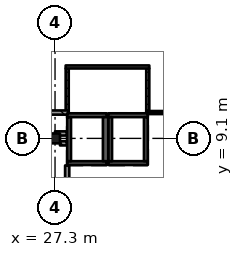
"""IFC4 building model, lengths in metres.
Left out: names, types, materials, properties, quantities, classifications, styles, units other than length and angle.
Written with IfcOpenShell. Run it as: python <this file> out.ifc"""

import sys

from ifc_helpers import new_model, si_unit, direction, frame, frame_2d, origin, origin_2d, place, context, subcontext, project, spatial, rectangle, extrude, element, fill, save


model = new_model("IFC4")
c1 = context("Model", 3, precision=1e-05, world=origin(), true_north=direction((0.0, 1.0)))
c2 = subcontext(c1, "Body", "Model", "MODEL_VIEW")
j1 = project(units=[si_unit("LENGTHUNIT", "METRE"), si_unit("PLANEANGLEUNIT", "RADIAN")], contexts=[c1])
p1 = place(None, origin())
s1 = spatial("IfcSite", under=j1, at=p1, CompositionType="ELEMENT")
p2 = place(p1, origin())
s2 = spatial("IfcBuilding", under=s1, at=p2, CompositionType="ELEMENT")
p3 = place(p2, frame((0.0, 0.0, 15.47)))
s3 = spatial("IfcBuildingStorey", under=s2, at=p3, CompositionType="ELEMENT", Elevation=15.47)
p4 = place(p3, frame((27.3, 9.1, 0.0), z_axis=(0.0, 0.0, 1.0), x_axis=(1.0, 0.0, 0.0)))
e1 = element("IfcColumn", 1, at=p4, inside=s3, PredefinedType="COLUMN", context=c2, shape_type="SweptSolid", body=[
    extrude(rectangle(XDim=0.65, YDim=0.65, at=origin_2d()), origin(), (0.0, 0.0, 1.0), 4.55),
])
p5 = place(p3, frame((30.7, 7.475, 0.0), z_axis=(0.0, 0.0, 1.0), x_axis=(-1.0, 0.0, 0.0)))
e2 = element("IfcWall", 2, at=p5, inside=s3, PredefinedType="SHEAR", context=c2, shape_type="SweptSolid", body=[
    extrude(rectangle(XDim=2.6, YDim=0.25, at=frame_2d((1.3, 0.0))), origin(), (0.0, 0.0, 1.0), 4.55),
])
p6 = place(p3, frame((30.7, 10.625, 0.0), z_axis=(0.0, 0.0, 1.0), x_axis=(-1.0, 0.0, 0.0)))
e3 = element("IfcWall", 3, at=p6, inside=s3, PredefinedType="SHEAR", context=c2, shape_type="SweptSolid", body=[
    extrude(rectangle(XDim=2.6, YDim=0.25, at=frame_2d((1.3, 0.0))), origin(), (0.0, 0.0, 1.0), 4.55),
])
p7 = place(p6, frame((0.8, 0.0, 0.0)))
e4 = element("IfcOpeningElement", 4, at=p7, cuts=e3, PredefinedType="OPENING", context=c2, shape_type="SweptSolid", body=[
    extrude(rectangle(XDim=1.0, YDim=2.1, at=frame_2d((0.5, 1.05))), frame((0.0, 0.135, 0.0), z_axis=(0.0, -1.0, 0.0), x_axis=(1.0, 0.0, 0.0)), (0.0, 0.0, 1.0), 0.27),
])
p8 = place(p3, frame((28.225, 10.5, 0.0), z_axis=(0.0, 0.0, 1.0), x_axis=(0.0, -1.0, 0.0)))
e5 = element("IfcWall", 5, at=p8, inside=s3, PredefinedType="SHEAR", context=c2, shape_type="SweptSolid", body=[
    extrude(rectangle(XDim=2.9, YDim=0.25, at=frame_2d((1.45, 0.0))), origin(), (0.0, 0.0, 1.0), 4.55),
])
p9 = place(p3, frame((30.625, 10.5, 0.0), z_axis=(0.0, 0.0, 1.0), x_axis=(0.0, -1.0, 0.0)))
e6 = element("IfcWall", 6, at=p9, inside=s3, PredefinedType="SHEAR", context=c2, shape_type="SweptSolid", body=[
    extrude(rectangle(XDim=2.9, YDim=0.35, at=frame_2d((1.45, 0.0))), origin(), (0.0, 0.0, 1.0), 4.55),
])
p10 = place(p3, frame((33.4, 7.475, 0.0), z_axis=(0.0, 0.0, 1.0), x_axis=(-1.0, 0.0, 0.0)))
e7 = element("IfcWall", 7, at=p10, inside=s3, PredefinedType="SHEAR", context=c2, shape_type="SweptSolid", body=[
    extrude(rectangle(XDim=2.6, YDim=0.25, at=frame_2d((1.3, 0.0))), origin(), (0.0, 0.0, 1.0), 4.55),
])
p11 = place(p3, frame((33.4, 10.625, 0.0), z_axis=(0.0, 0.0, 1.0), x_axis=(-1.0, 0.0, 0.0)))
e8 = element("IfcWall", 8, at=p11, inside=s3, PredefinedType="SHEAR", context=c2, shape_type="SweptSolid", body=[
    extrude(rectangle(XDim=2.6, YDim=0.25, at=frame_2d((1.3, 0.0))), origin(), (0.0, 0.0, 1.0), 4.55),
])
p12 = place(p11, frame((0.8, 0.0, 0.0)))
e9 = element("IfcOpeningElement", 9, at=p12, cuts=e8, PredefinedType="OPENING", context=c2, shape_type="SweptSolid", body=[
    extrude(rectangle(XDim=1.0, YDim=2.1, at=frame_2d((0.5, 1.05))), frame((0.0, 0.135, 0.0), z_axis=(0.0, -1.0, 0.0), x_axis=(1.0, 0.0, 0.0)), (0.0, 0.0, 1.0), 0.27),
])
for number, where, z_axis, x_axis in (
    (10, (30.925, 10.5, 0.0), (0.0, 0.0, 1.0), (0.0, -1.0, 0.0)),
    (11, (33.275, 10.5, 0.0), (0.0, 0.0, 1.0), (0.0, -1.0, 0.0)),
):
    element("IfcWall", number, at=place(p3, frame(where, z_axis=z_axis, x_axis=x_axis)), inside=s3, PredefinedType="SHEAR", context=c2, shape_type="SweptSolid", body=[
        extrude(rectangle(XDim=2.9, YDim=0.25, at=frame_2d((1.45, 0.0))), origin(), (0.0, 0.0, 1.0), 4.55),
    ])
p13 = place(p3, frame((27.3, 9.425, 0.0), z_axis=(0.0, 0.0, 1.0), x_axis=(1.0, 0.0, 0.0)))
e12 = element("IfcWall", 12, at=p13, inside=s3, PredefinedType="SOLIDWALL", context=c2, shape_type="SweptSolid", body=[
    extrude(rectangle(XDim=0.77, YDim=0.275, at=frame_2d((0.385, 0.0))), origin(), (0.0, 0.0, 1.0), 4.3),
])
p14 = place(p3, frame((27.625, 8.775, 0.0), z_axis=(0.0, 0.0, 1.0), x_axis=(1.0, 0.0, 0.0)))
e13 = element("IfcWall", 13, at=p14, inside=s3, PredefinedType="SOLIDWALL", context=c2, shape_type="SweptSolid", body=[
    extrude(rectangle(XDim=0.445, YDim=0.275, at=frame_2d((0.223, 0.0))), origin(), (0.0, 0.0, 1.0), 4.3),
])
p15 = place(p3, frame((28.1, 7.32, 0.0), z_axis=(0.0, 0.0, 1.0), x_axis=(0.0, -1.0, 0.0)))
e14 = element("IfcWall", 14, at=p15, inside=s3, PredefinedType="SOLIDWALL", context=c2, shape_type="SweptSolid", body=[
    extrude(rectangle(XDim=6.483, YDim=0.275, at=frame_2d((3.241, 0.0))), origin(), (0.0, 0.0, 1.0), 4.3),
])
p16 = place(p3, frame((28.1, 13.7, 0.0), z_axis=(0.0, 0.0, 1.0), x_axis=(0.0, -1.0, 0.0)))
e15 = element("IfcWall", 15, at=p16, inside=s3, PredefinedType="PARTITIONING", context=c2, shape_type="SweptSolid", body=[
    extrude(rectangle(XDim=2.762, YDim=0.2, at=frame_2d((1.381, 0.0))), origin(), (0.0, 0.0, 1.0), 4.3),
])
p17 = place(p16, frame((0.45, 0.0, 0.0)))
e16 = element("IfcOpeningElement", 16, at=p17, cuts=e15, PredefinedType="OPENING", context=c2, shape_type="SweptSolid", body=[
    extrude(rectangle(XDim=1.8, YDim=2.4, at=frame_2d((0.9, 1.2))), frame((0.0, 0.11, 0.0), z_axis=(0.0, -1.0, 0.0), x_axis=(1.0, 0.0, 0.0)), (0.0, 0.0, 1.0), 0.22),
])
p18 = place(p3, frame((28.2, 10.8, 0.0), z_axis=(0.0, 0.0, 1.0), x_axis=(-1.0, 0.0, 0.0)))
e17 = element("IfcWall", 17, at=p18, inside=s3, PredefinedType="SOLIDWALL", context=c2, shape_type="SweptSolid", body=[
    extrude(rectangle(XDim=3.87, YDim=0.275, at=frame_2d((1.935, 0.0))), origin(), (0.0, 0.0, 1.0), 4.3),
])
p19 = place(p18, frame((1.35, 0.0, 0.0)))
e18 = element("IfcOpeningElement", 18, at=p19, cuts=e17, PredefinedType="OPENING", context=c2, shape_type="SweptSolid", body=[
    extrude(rectangle(XDim=1.2, YDim=2.4, at=frame_2d((0.6, 1.2))), frame((0.0, 0.147, 0.0), z_axis=(0.0, -1.0, 0.0), x_axis=(1.0, 0.0, 0.0)), (0.0, 0.0, 1.0), 0.295),
])
p20 = place(p3, frame((33.4, 10.9, 0.0), z_axis=(0.0, 0.0, 1.0), x_axis=(0.0, 1.0, 0.0)))
e19 = element("IfcWall", 19, at=p20, inside=s3, PredefinedType="PARTITIONING", context=c2, shape_type="SweptSolid", body=[
    extrude(rectangle(XDim=2.8, YDim=0.2, at=frame_2d((1.4, 0.0))), origin(), (0.0, 0.0, 1.0), 4.3),
])
p21 = place(p20, frame((0.55, 0.0, 0.0)))
e20 = element("IfcOpeningElement", 20, at=p21, cuts=e19, PredefinedType="OPENING", context=c2, shape_type="SweptSolid", body=[
    extrude(rectangle(XDim=1.8, YDim=2.4, at=frame_2d((0.9, 1.2))), frame((0.0, 0.11, 0.0), z_axis=(0.0, -1.0, 0.0), x_axis=(1.0, 0.0, 0.0)), (0.0, 0.0, 1.0), 0.22),
])
p22 = place(p3, frame((33.5, 13.8, 0.0), z_axis=(0.0, 0.0, 1.0), x_axis=(-1.0, 0.0, 0.0)))
e21 = element("IfcWall", 21, at=p22, inside=s3, PredefinedType="PARTITIONING", context=c2, shape_type="SweptSolid", body=[
    extrude(rectangle(XDim=5.5, YDim=0.2, at=frame_2d((2.75, 0.0))), origin(), (0.0, 0.0, 1.0), 4.3),
])
p23 = place(p22, frame((1.85, 0.0, 0.0)))
e22 = element("IfcOpeningElement", 22, at=p23, cuts=e21, PredefinedType="OPENING", context=c2, shape_type="SweptSolid", body=[
    extrude(rectangle(XDim=1.8, YDim=2.4, at=frame_2d((0.9, 1.2))), frame((0.0, 0.11, 0.0), z_axis=(0.0, -1.0, 0.0), x_axis=(1.0, 0.0, 0.0)), (0.0, 0.0, 1.0), 0.22),
])
p24 = place(p3, frame((36.15, 10.8, 0.0), z_axis=(0.0, 0.0, 1.0), x_axis=(-1.0, 0.0, 0.0)))
e23 = element("IfcWall", 23, at=p24, inside=s3, PredefinedType="PARTITIONING", context=c2, shape_type="SweptSolid", body=[
    extrude(rectangle(XDim=2.85, YDim=0.2, at=frame_2d((1.425, 0.0))), origin(), (0.0, 0.0, 1.0), 4.3),
])
p25 = place(p24, frame((0.55, 0.0, 0.0)))
e24 = element("IfcOpeningElement", 24, at=p25, cuts=e23, PredefinedType="OPENING", context=c2, shape_type="SweptSolid", body=[
    extrude(rectangle(XDim=1.8, YDim=2.4, at=frame_2d((0.9, 1.2))), frame((0.0, 0.11, 0.0), z_axis=(0.0, -1.0, 0.0), x_axis=(1.0, 0.0, 0.0)), (0.0, 0.0, 1.0), 0.22),
])
p26 = place(p23, origin())
e25 = element("IfcDoor", 25, at=p26, inside=s3, OperationType="DOUBLE_DOOR_SINGLE_SWING", PredefinedType="DOOR", context=c2, shape_type="SweptSolid", body=[
    extrude(rectangle(XDim=1.8, YDim=2.4, at=frame_2d((0.9, 1.2))), frame((0.0, 0.025, 0.0), z_axis=(0.0, -1.0, 0.0), x_axis=(1.0, 0.0, 0.0)), (0.0, 0.0, 1.0), 0.05),
])
fill(e22, e25)
p27 = place(p21, origin())
e26 = element("IfcDoor", 26, at=p27, inside=s3, OperationType="DOUBLE_DOOR_SINGLE_SWING", PredefinedType="DOOR", context=c2, shape_type="SweptSolid", body=[
    extrude(rectangle(XDim=1.8, YDim=2.4, at=frame_2d((0.9, 1.2))), frame((0.0, 0.025, 0.0), z_axis=(0.0, -1.0, 0.0), x_axis=(1.0, 0.0, 0.0)), (0.0, 0.0, 1.0), 0.05),
])
fill(e20, e26)
p28 = place(p17, origin())
e27 = element("IfcDoor", 27, at=p28, inside=s3, OperationType="DOUBLE_DOOR_SINGLE_SWING", PredefinedType="DOOR", context=c2, shape_type="SweptSolid", body=[
    extrude(rectangle(XDim=1.8, YDim=2.4, at=frame_2d((0.9, 1.2))), frame((0.0, 0.025, 0.0), z_axis=(0.0, -1.0, 0.0), x_axis=(1.0, 0.0, 0.0)), (0.0, 0.0, 1.0), 0.05),
])
fill(e16, e27)
p29 = place(p25, origin())
e28 = element("IfcDoor", 28, at=p29, inside=s3, OperationType="DOUBLE_DOOR_SINGLE_SWING", PredefinedType="DOOR", context=c2, shape_type="SweptSolid", body=[
    extrude(rectangle(XDim=1.8, YDim=2.4, at=frame_2d((0.9, 1.2))), frame((0.0, 0.025, 0.0), z_axis=(0.0, -1.0, 0.0), x_axis=(1.0, 0.0, 0.0)), (0.0, 0.0, 1.0), 0.05),
])
fill(e24, e28)
p30 = place(p7, origin())
e29 = element("IfcDoor", 29, at=p30, inside=s3, OperationType="DOUBLE_DOOR_SLIDING", PredefinedType="DOOR", context=c2, shape_type="SweptSolid", body=[
    extrude(rectangle(XDim=1.0, YDim=2.1, at=frame_2d((0.5, 1.05))), frame((0.0, 0.025, 0.0), z_axis=(0.0, -1.0, 0.0), x_axis=(1.0, 0.0, 0.0)), (0.0, 0.0, 1.0), 0.05),
])
fill(e4, e29)
p31 = place(p12, origin())
e30 = element("IfcDoor", 30, at=p31, inside=s3, OperationType="DOUBLE_DOOR_SLIDING", PredefinedType="DOOR", context=c2, shape_type="SweptSolid", body=[
    extrude(rectangle(XDim=1.0, YDim=2.1, at=frame_2d((0.5, 1.05))), frame((0.0, 0.025, 0.0), z_axis=(0.0, -1.0, 0.0), x_axis=(1.0, 0.0, 0.0)), (0.0, 0.0, 1.0), 0.05),
])
fill(e9, e30)
save(model, sys.argv[1])
